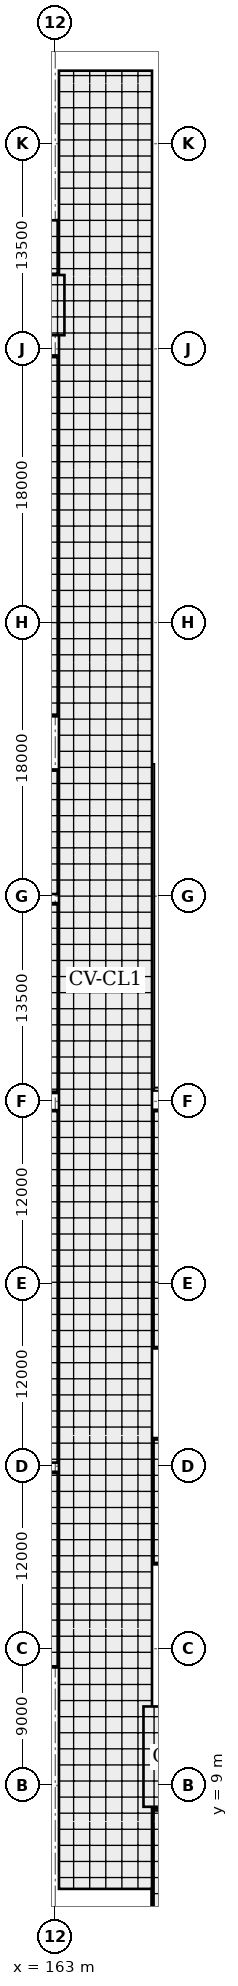
"""IFC4 building model, lengths in metres.
Left out: names, types, materials, properties, quantities, classifications, styles, units other than length and angle.
Written with IfcOpenShell. Run it as: python <this file> out.ifc"""

import sys

from ifc_helpers import new_model, si_unit, direction, frame, frame_2d, origin, origin_2d, place, context, subcontext, project, spatial, rectangle, extrude, element, fill, save


model = new_model("IFC4")
c1 = context("Model", 3, precision=1e-05, world=origin(), true_north=direction((0.0, 1.0)))
c2 = subcontext(c1, "Body", "Model", "MODEL_VIEW")
j1 = project(units=[si_unit("LENGTHUNIT", "METRE"), si_unit("PLANEANGLEUNIT", "RADIAN")], contexts=[c1])
p1 = place(None, origin())
s1 = spatial("IfcSite", under=j1, at=p1, CompositionType="ELEMENT")
p2 = place(p1, origin())
s2 = spatial("IfcBuilding", under=s1, at=p2, CompositionType="ELEMENT")
p3 = place(p2, frame((0.0, 0.0, 6.6)))
s3 = spatial("IfcBuildingStorey", under=s2, at=p3, CompositionType="ELEMENT", Elevation=6.6)
for number, where, z_axis, x_axis in (
    (1, (163.0, 9.0, 0.0), (0.0, 0.0, 1.0), (1.0, 0.0, 0.0)),
    (2, (163.0, 18.0, 0.0), (0.0, 0.0, 1.0), (1.0, 0.0, 0.0)),
    (3, (163.0, 30.0, 0.0), (0.0, 0.0, 1.0), (1.0, 0.0, 0.0)),
    (4, (163.0, 42.0, 0.0), (0.0, 0.0, 1.0), (1.0, 0.0, 0.0)),
    (5, (163.0, 54.0, 0.0), (0.0, 0.0, 1.0), (1.0, 0.0, 0.0)),
):
    element("IfcColumn", number, at=place(p3, frame(where, z_axis=z_axis, x_axis=x_axis)), inside=s3, PredefinedType="COLUMN", context=c2, shape_type="SweptSolid", body=[
        extrude(rectangle(XDim=0.7, YDim=0.7, at=origin_2d()), origin(), (0.0, 0.0, 1.0), 4.2),
    ])
for number, where, z_axis, x_axis in (
    (6, (163.0, 67.5, 0.0), (0.0, 0.0, 1.0), (1.0, 0.0, 0.0)),
    (7, (163.0, 76.5, 0.0), (0.0, 0.0, 1.0), (1.0, 0.0, 0.0)),
    (8, (163.0, 85.5, 0.0), (0.0, 0.0, 1.0), (1.0, 0.0, 0.0)),
    (9, (163.0, 94.5, 0.0), (0.0, 0.0, 1.0), (1.0, 0.0, 0.0)),
    (10, (163.0, 103.5, 0.0), (0.0, 0.0, 1.0), (1.0, 0.0, 0.0)),
    (11, (163.0, 117.0, 0.0), (0.0, 0.0, 1.0), (1.0, 0.0, 0.0)),
):
    element("IfcColumn", number, at=place(p3, frame(where, z_axis=z_axis, x_axis=x_axis)), inside=s3, PredefinedType="COLUMN", context=c2, shape_type="SweptSolid", body=[
        extrude(rectangle(XDim=0.8, YDim=0.8, at=origin_2d()), origin(), (0.0, 0.0, 1.0), 4.2),
    ])
p4 = place(p3, frame((163.2, 16.8, 0.0), z_axis=(0.0, 0.0, 1.0), x_axis=(-1.0, 0.0, 0.0)))
e12 = element("IfcWall", 12, at=p4, inside=s3, PredefinedType="PARTITIONING", context=c2, shape_type="SweptSolid", body=[
    extrude(rectangle(XDim=10.6, YDim=0.12, at=frame_2d((5.3, 0.0))), origin(), (0.0, 0.0, 1.0), 3.545),
])
p5 = place(p3, frame((152.6, 29.6, 0.0), z_axis=(0.0, 0.0, 1.0), x_axis=(1.0, 0.0, 0.0)))
e13 = element("IfcWall", 13, at=p5, inside=s3, PredefinedType="PARTITIONING", context=c2, shape_type="SweptSolid", body=[
    extrude(rectangle(XDim=10.6, YDim=0.12, at=frame_2d((5.3, 0.0))), origin(), (0.0, 0.0, 1.0), 3.385),
])
p6 = place(p3, frame((163.2, 29.6, 0.0), z_axis=(0.0, 0.0, 1.0), x_axis=(0.0, -1.0, 0.0)))
e14 = element("IfcWall", 14, at=p6, inside=s3, PredefinedType="PARTITIONING", context=c2, shape_type="SweptSolid", body=[
    extrude(rectangle(XDim=12.8, YDim=0.12, at=frame_2d((6.4, 0.0))), origin(), (0.0, 0.0, 1.0), 3.385),
])
p7 = place(p6, frame((5.625, 0.0, 0.0)))
e15 = element("IfcOpeningElement", 15, at=p7, cuts=e14, PredefinedType="OPENING", context=c2, shape_type="SweptSolid", body=[
    extrude(rectangle(XDim=1.55, YDim=2.1, at=frame_2d((0.775, 1.05))), frame((0.0, 0.07, 0.0), z_axis=(0.0, -1.0, 0.0), x_axis=(1.0, 0.0, 0.0)), (0.0, 0.0, 1.0), 0.14),
])
p8 = place(p3, frame((136.8, 53.4, 0.0), z_axis=(0.0, 0.0, 1.0), x_axis=(1.0, 0.0, 0.0)))
e16 = element("IfcWall", 16, at=p8, inside=s3, PredefinedType="PARTITIONING", context=c2, shape_type="SweptSolid", body=[
    extrude(rectangle(XDim=26.4, YDim=0.1, at=frame_2d((13.2, 0.0))), origin(), (0.0, 0.0, 1.0), 3.37),
])
p9 = place(p3, frame((163.2, 53.4, 0.0), z_axis=(0.0, 0.0, 1.0), x_axis=(0.0, -1.0, 0.0)))
e17 = element("IfcWall", 17, at=p9, inside=s3, PredefinedType="PARTITIONING", context=c2, shape_type="SweptSolid", body=[
    extrude(rectangle(XDim=23.2, YDim=0.1, at=frame_2d((11.6, 0.0))), origin(), (0.0, 0.0, 1.0), 3.37),
])
p10 = place(p9, frame((12.375, 0.0, 0.0)))
e18 = element("IfcOpeningElement", 18, at=p10, cuts=e17, PredefinedType="OPENING", context=c2, shape_type="SweptSolid", body=[
    extrude(rectangle(XDim=1.65, YDim=2.1, at=frame_2d((0.825, 1.05))), frame((0.0, 0.06, 0.0), z_axis=(0.0, -1.0, 0.0), x_axis=(1.0, 0.0, 0.0)), (0.0, 0.0, 1.0), 0.12),
])
p11 = place(p9, frame((17.632, 0.0, 0.0)))
e19 = element("IfcOpeningElement", 19, at=p11, cuts=e17, PredefinedType="OPENING", context=c2, shape_type="SweptSolid", body=[
    extrude(rectangle(XDim=1.65, YDim=2.1, at=frame_2d((0.825, 1.05))), frame((0.0, 0.06, 0.0), z_axis=(0.0, -1.0, 0.0), x_axis=(1.0, 0.0, 0.0)), (0.0, 0.0, 1.0), 0.12),
])
p12 = place(p3, frame((169.4, 7.4, 0.0), z_axis=(0.0, 0.0, 1.0), x_axis=(1.0, 0.0, 0.0)))
e20 = element("IfcWall", 20, at=p12, inside=s3, PredefinedType="PARTITIONING", context=c2, shape_type="SweptSolid", body=[
    extrude(rectangle(XDim=17.8, YDim=0.19, at=frame_2d((8.9, 0.0))), origin(), (0.0, 0.0, 1.0), 3.465),
])
p13 = place(p12, frame((8.125, 0.0, 0.0)))
e21 = element("IfcOpeningElement", 21, at=p13, cuts=e20, PredefinedType="OPENING", context=c2, shape_type="SweptSolid", body=[
    extrude(rectangle(XDim=1.55, YDim=2.1, at=frame_2d((0.775, 1.05))), frame((0.0, 0.105, 0.0), z_axis=(0.0, -1.0, 0.0), x_axis=(1.0, 0.0, 0.0)), (0.0, 0.0, 1.0), 0.21),
])
p14 = place(p3, frame((169.4, 0.8, 0.0), z_axis=(0.0, 0.0, 1.0), x_axis=(0.0, 1.0, 0.0)))
e22 = element("IfcWall", 22, at=p14, inside=s3, PredefinedType="PARTITIONING", context=c2, shape_type="SweptSolid", body=[
    extrude(rectangle(XDim=6.6, YDim=0.19, at=frame_2d((3.3, 0.0))), origin(), (0.0, 0.0, 1.0), 3.475),
])
for number, where, z_axis, x_axis in (
    (23, (187.2, 23.6, 0.0), (0.0, 0.0, 1.0), (-1.0, 0.0, 0.0)),
    (24, (169.4, 31.8, 0.0), (0.0, 0.0, 1.0), (1.0, 0.0, 0.0)),
):
    element("IfcWall", number, at=place(p3, frame(where, z_axis=z_axis, x_axis=x_axis)), inside=s3, PredefinedType="PARTITIONING", context=c2, shape_type="SweptSolid", body=[
        extrude(rectangle(XDim=17.8, YDim=0.16, at=frame_2d((8.9, 0.0))), origin(), (0.0, 0.0, 1.0), 3.345),
    ])
p15 = place(p3, frame((169.4, 23.6, 0.0), z_axis=(0.0, 0.0, 1.0), x_axis=(0.0, 1.0, 0.0)))
e25 = element("IfcWall", 25, at=p15, inside=s3, PredefinedType="PARTITIONING", context=c2, shape_type="SweptSolid", body=[
    extrude(rectangle(XDim=8.2, YDim=0.16, at=frame_2d((4.1, 0.0))), origin(), (0.0, 0.0, 1.0), 3.495),
])
p16 = place(p15, frame((3.425, 0.0, 0.0)))
e26 = element("IfcOpeningElement", 26, at=p16, cuts=e25, PredefinedType="OPENING", context=c2, shape_type="SweptSolid", body=[
    extrude(rectangle(XDim=1.35, YDim=2.1, at=frame_2d((0.675, 1.05))), frame((0.0, 0.09, 0.0), z_axis=(0.0, -1.0, 0.0), x_axis=(1.0, 0.0, 0.0)), (0.0, 0.0, 1.0), 0.18),
])
for number, where, z_axis, x_axis in (
    (27, (187.2, 37.8, 0.0), (0.0, 0.0, 1.0), (-1.0, 0.0, 0.0)),
    (28, (169.4, 53.4, 0.0), (0.0, 0.0, 1.0), (1.0, 0.0, 0.0)),
):
    element("IfcWall", number, at=place(p3, frame(where, z_axis=z_axis, x_axis=x_axis)), inside=s3, PredefinedType="PARTITIONING", context=c2, shape_type="SweptSolid", body=[
        extrude(rectangle(XDim=17.8, YDim=0.15, at=frame_2d((8.9, 0.0))), origin(), (0.0, 0.0, 1.0), 3.345),
    ])
p17 = place(p3, frame((169.4, 37.8, 0.0), z_axis=(0.0, 0.0, 1.0), x_axis=(0.0, 1.0, 0.0)))
e29 = element("IfcWall", 29, at=p17, inside=s3, PredefinedType="PARTITIONING", context=c2, shape_type="SweptSolid", body=[
    extrude(rectangle(XDim=15.6, YDim=0.15, at=frame_2d((7.8, 0.0))), origin(), (0.0, 0.0, 1.0), 3.485),
])
p18 = place(p17, frame((7.025, 0.0, 0.0)))
e30 = element("IfcOpeningElement", 30, at=p18, cuts=e29, PredefinedType="OPENING", context=c2, shape_type="SweptSolid", body=[
    extrude(rectangle(XDim=1.55, YDim=2.1, at=frame_2d((0.775, 1.05))), frame((0.0, 0.085, 0.0), z_axis=(0.0, -1.0, 0.0), x_axis=(1.0, 0.0, 0.0)), (0.0, 0.0, 1.0), 0.17),
])
for number, where, z_axis, x_axis in (
    (31, (163.2, 54.6, 0.0), (0.0, 0.0, 1.0), (-1.0, 0.0, 0.0)),
    (32, (145.6, 67.0, 0.0), (0.0, 0.0, 1.0), (1.0, 0.0, 0.0)),
):
    element("IfcWall", number, at=place(p3, frame(where, z_axis=z_axis, x_axis=x_axis)), inside=s3, PredefinedType="PARTITIONING", context=c2, shape_type="SweptSolid", body=[
        extrude(rectangle(XDim=17.6, YDim=0.14, at=frame_2d((8.8, 0.0))), origin(), (0.0, 0.0, 1.0), 3.37),
    ])
p19 = place(p3, frame((163.2, 67.0, 0.0), z_axis=(0.0, 0.0, 1.0), x_axis=(0.0, -1.0, 0.0)))
e33 = element("IfcWall", 33, at=p19, inside=s3, PredefinedType="PARTITIONING", context=c2, shape_type="SweptSolid", body=[
    extrude(rectangle(XDim=12.4, YDim=0.14, at=frame_2d((6.2, 0.0))), origin(), (0.0, 0.0, 1.0), 3.37),
])
p20 = place(p19, frame((5.575, 0.0, 0.0)))
e34 = element("IfcOpeningElement", 34, at=p20, cuts=e33, PredefinedType="OPENING", context=c2, shape_type="SweptSolid", body=[
    extrude(rectangle(XDim=1.25, YDim=2.1, at=frame_2d((0.625, 1.05))), frame((0.0, 0.08, 0.0), z_axis=(0.0, -1.0, 0.0), x_axis=(1.0, 0.0, 0.0)), (0.0, 0.0, 1.0), 0.16),
])
p21 = place(p3, frame((154.6, 75.8, 0.0), z_axis=(0.0, 0.0, 1.0), x_axis=(1.0, 0.0, 0.0)))
e35 = element("IfcWall", 35, at=p21, inside=s3, PredefinedType="PARTITIONING", context=c2, shape_type="SweptSolid", body=[
    extrude(rectangle(XDim=8.6, YDim=0.12, at=frame_2d((4.3, 0.0))), origin(), (0.0, 0.0, 1.0), 3.515),
])
p22 = place(p21, frame((3.85, 0.0, 0.0)))
e36 = element("IfcOpeningElement", 36, at=p22, cuts=e35, PredefinedType="OPENING", context=c2, shape_type="SweptSolid", body=[
    extrude(rectangle(XDim=0.9, YDim=2.1, at=frame_2d((0.45, 1.05))), frame((0.0, 0.07, 0.0), z_axis=(0.0, -1.0, 0.0), x_axis=(1.0, 0.0, 0.0)), (0.0, 0.0, 1.0), 0.14),
])
p23 = place(p3, frame((163.2, 75.8, 0.0), z_axis=(0.0, 0.0, 1.0), x_axis=(0.0, -1.0, 0.0)))
e37 = element("IfcWall", 37, at=p23, inside=s3, PredefinedType="PARTITIONING", context=c2, shape_type="SweptSolid", body=[
    extrude(rectangle(XDim=8.2, YDim=0.12, at=frame_2d((4.1, 0.0))), origin(), (0.0, 0.0, 1.0), 3.37),
])
p24 = place(p3, frame((163.2, 79.4, 0.0), z_axis=(0.0, 0.0, 1.0), x_axis=(-1.0, 0.0, 0.0)))
e38 = element("IfcWall", 38, at=p24, inside=s3, PredefinedType="PARTITIONING", context=c2, shape_type="SweptSolid", body=[
    extrude(rectangle(XDim=10.2, YDim=0.19, at=frame_2d((5.1, 0.0))), origin(), (0.0, 0.0, 1.0), 3.565),
])
p25 = place(p3, frame((153.0, 103.0, 0.0), z_axis=(0.0, 0.0, 1.0), x_axis=(1.0, 0.0, 0.0)))
e39 = element("IfcWall", 39, at=p25, inside=s3, PredefinedType="PARTITIONING", context=c2, shape_type="SweptSolid", body=[
    extrude(rectangle(XDim=10.2, YDim=0.19, at=frame_2d((5.1, 0.0))), origin(), (0.0, 0.0, 1.0), 3.355),
])
p26 = place(p3, frame((163.2, 103.0, 0.0), z_axis=(0.0, 0.0, 1.0), x_axis=(0.0, -1.0, 0.0)))
e40 = element("IfcWall", 40, at=p26, inside=s3, PredefinedType="PARTITIONING", context=c2, shape_type="SweptSolid", body=[
    extrude(rectangle(XDim=23.6, YDim=0.19, at=frame_2d((11.8, 0.0))), origin(), (0.0, 0.0, 1.0), 3.355),
])
p27 = place(p26, frame((11.225, 0.0, 0.0)))
e41 = element("IfcOpeningElement", 41, at=p27, cuts=e40, PredefinedType="OPENING", context=c2, shape_type="SweptSolid", body=[
    extrude(rectangle(XDim=1.15, YDim=2.1, at=frame_2d((0.575, 1.05))), frame((0.0, 0.105, 0.0), z_axis=(0.0, -1.0, 0.0), x_axis=(1.0, 0.0, 0.0)), (0.0, 0.0, 1.0), 0.21),
])
p28 = place(p3, frame((187.2, 54.8, 0.0), z_axis=(0.0, 0.0, 1.0), x_axis=(-1.0, 0.0, 0.0)))
e42 = element("IfcWall", 42, at=p28, inside=s3, PredefinedType="SOLIDWALL", context=c2, shape_type="SweptSolid", body=[
    extrude(rectangle(XDim=17.8, YDim=0.22, at=frame_2d((8.9, 0.0))), origin(), (0.0, 0.0, 1.0), 3.37),
])
p29 = place(p3, frame((169.4, 54.8, 0.0), z_axis=(0.0, 0.0, 1.0), x_axis=(0.0, 1.0, 0.0)))
e43 = element("IfcWall", 43, at=p29, inside=s3, PredefinedType="SOLIDWALL", context=c2, shape_type="SweptSolid", body=[
    extrude(rectangle(XDim=21.4, YDim=0.22, at=frame_2d((10.7, 0.0))), origin(), (0.0, 0.0, 1.0), 3.485),
])
p30 = place(p29, frame((10.0, 0.0, 0.0)))
e44 = element("IfcOpeningElement", 44, at=p30, cuts=e43, PredefinedType="OPENING", context=c2, shape_type="SweptSolid", body=[
    extrude(rectangle(XDim=1.4, YDim=2.1, at=frame_2d((0.7, 1.05))), frame((0.0, 0.12, 0.0), z_axis=(0.0, -1.0, 0.0), x_axis=(1.0, 0.0, 0.0)), (0.0, 0.0, 1.0), 0.24),
])
p31 = place(p3, frame((163.2, 108.4, 0.0), z_axis=(0.0, 0.0, 1.0), x_axis=(-1.0, 0.0, 0.0)))
e45 = element("IfcWall", 45, at=p31, inside=s3, PredefinedType="PARTITIONING", context=c2, shape_type="SweptSolid", body=[
    extrude(rectangle(XDim=16.6, YDim=0.14, at=frame_2d((8.3, 0.0))), origin(), (0.0, 0.0, 1.0), 3.355),
])
p32 = place(p31, frame((7.725, 0.0, 0.0)))
e46 = element("IfcOpeningElement", 46, at=p32, cuts=e45, PredefinedType="OPENING", context=c2, shape_type="SweptSolid", body=[
    extrude(rectangle(XDim=1.15, YDim=2.1, at=frame_2d((0.575, 1.05))), frame((0.0, 0.08, 0.0), z_axis=(0.0, -1.0, 0.0), x_axis=(1.0, 0.0, 0.0)), (0.0, 0.0, 1.0), 0.16),
])
p33 = place(p3, frame((163.2, 112.0, 0.0), z_axis=(0.0, 0.0, 1.0), x_axis=(0.0, -1.0, 0.0)))
e47 = element("IfcWall", 47, at=p33, inside=s3, PredefinedType="PARTITIONING", context=c2, shape_type="SweptSolid", body=[
    extrude(rectangle(XDim=3.6, YDim=0.14, at=frame_2d((1.8, 0.0))), origin(), (0.0, 0.0, 1.0), 3.355),
])
p34 = place(p7, origin())
e48 = element("IfcDoor", 48, at=p34, inside=s3, OperationType="SINGLE_SWING_RIGHT", PredefinedType="DOOR", context=c2, shape_type="SweptSolid", body=[
    extrude(rectangle(XDim=1.55, YDim=2.1, at=frame_2d((0.775, 1.05))), frame((0.0, 0.025, 0.0), z_axis=(0.0, -1.0, 0.0), x_axis=(1.0, 0.0, 0.0)), (0.0, 0.0, 1.0), 0.05),
])
fill(e15, e48)
p35 = place(p10, origin())
e49 = element("IfcDoor", 49, at=p35, inside=s3, OperationType="SINGLE_SWING_RIGHT", PredefinedType="DOOR", context=c2, shape_type="SweptSolid", body=[
    extrude(rectangle(XDim=1.65, YDim=2.1, at=frame_2d((0.825, 1.05))), frame((0.0, 0.025, 0.0), z_axis=(0.0, -1.0, 0.0), x_axis=(1.0, 0.0, 0.0)), (0.0, 0.0, 1.0), 0.05),
])
fill(e18, e49)
p36 = place(p11, origin())
e50 = element("IfcDoor", 50, at=p36, inside=s3, OperationType="SINGLE_SWING_LEFT", PredefinedType="DOOR", context=c2, shape_type="SweptSolid", body=[
    extrude(rectangle(XDim=1.65, YDim=2.1, at=frame_2d((0.825, 1.05))), frame((0.0, 0.025, 0.0), z_axis=(0.0, -1.0, 0.0), x_axis=(1.0, 0.0, 0.0)), (0.0, 0.0, 1.0), 0.05),
])
fill(e19, e50)
p37 = place(p16, origin())
e51 = element("IfcDoor", 51, at=p37, inside=s3, OperationType="SINGLE_SWING_LEFT", PredefinedType="DOOR", context=c2, shape_type="SweptSolid", body=[
    extrude(rectangle(XDim=1.35, YDim=2.1, at=frame_2d((0.675, 1.05))), frame((0.0, 0.025, 0.0), z_axis=(0.0, -1.0, 0.0), x_axis=(1.0, 0.0, 0.0)), (0.0, 0.0, 1.0), 0.05),
])
fill(e26, e51)
p38 = place(p18, origin())
e52 = element("IfcDoor", 52, at=p38, inside=s3, OperationType="SINGLE_SWING_RIGHT", PredefinedType="DOOR", context=c2, shape_type="SweptSolid", body=[
    extrude(rectangle(XDim=1.55, YDim=2.1, at=frame_2d((0.775, 1.05))), frame((0.0, 0.025, 0.0), z_axis=(0.0, -1.0, 0.0), x_axis=(1.0, 0.0, 0.0)), (0.0, 0.0, 1.0), 0.05),
])
fill(e30, e52)
p39 = place(p20, origin())
e53 = element("IfcDoor", 53, at=p39, inside=s3, OperationType="SINGLE_SWING_LEFT", PredefinedType="DOOR", context=c2, shape_type="SweptSolid", body=[
    extrude(rectangle(XDim=1.25, YDim=2.1, at=frame_2d((0.625, 1.05))), frame((0.0, 0.025, 0.0), z_axis=(0.0, -1.0, 0.0), x_axis=(1.0, 0.0, 0.0)), (0.0, 0.0, 1.0), 0.05),
])
fill(e34, e53)
p40 = place(p27, origin())
e54 = element("IfcDoor", 54, at=p40, inside=s3, OperationType="SINGLE_SWING_LEFT", PredefinedType="DOOR", context=c2, shape_type="SweptSolid", body=[
    extrude(rectangle(XDim=1.15, YDim=2.1, at=frame_2d((0.575, 1.05))), frame((0.0, 0.025, 0.0), z_axis=(0.0, -1.0, 0.0), x_axis=(1.0, 0.0, 0.0)), (0.0, 0.0, 1.0), 0.05),
])
fill(e41, e54)
p41 = place(p30, origin())
e55 = element("IfcDoor", 55, at=p41, inside=s3, OperationType="SINGLE_SWING_RIGHT", PredefinedType="DOOR", context=c2, shape_type="SweptSolid", body=[
    extrude(rectangle(XDim=1.4, YDim=2.1, at=frame_2d((0.7, 1.05))), frame((0.0, 0.025, 0.0), z_axis=(0.0, -1.0, 0.0), x_axis=(1.0, 0.0, 0.0)), (0.0, 0.0, 1.0), 0.05),
])
fill(e44, e55)
save(model, sys.argv[1])
